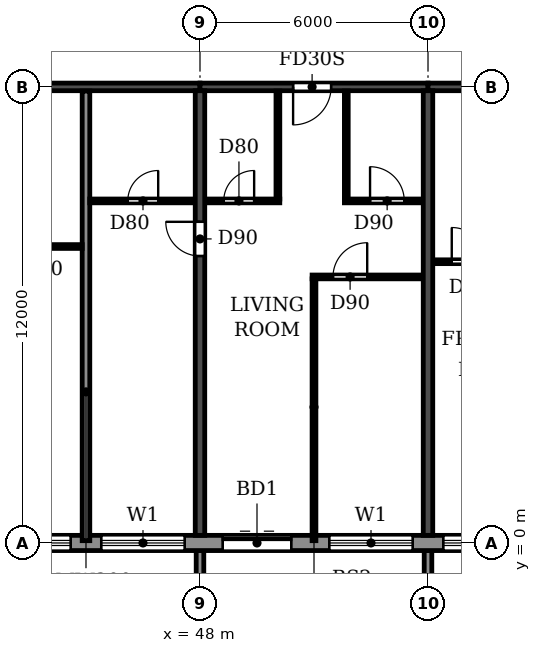
"""IFC4 building model, lengths in metres.
Left out: names, types, materials, properties, quantities, classifications, styles, units other than length and angle.
Written with IfcOpenShell. Run it as: python <this file> out.ifc"""

import sys

from ifc_helpers import new_model, si_unit, direction, frame, frame_2d, origin, place, context, subcontext, project, spatial, polyline, rectangle, outline, extrude, source, transform, mapped, element, fill, save


model = new_model("IFC4")
c1 = context("Model", 3, precision=1e-05, world=origin(), true_north=direction((0.0, 1.0)))
c2 = subcontext(c1, "Body", "Model", "MODEL_VIEW")
j1 = project(units=[si_unit("LENGTHUNIT", "METRE"), si_unit("PLANEANGLEUNIT", "RADIAN")], contexts=[c1])
p1 = place(None, origin())
s1 = spatial("IfcSite", under=j1, at=p1, CompositionType="ELEMENT")
p2 = place(p1, origin())
s2 = spatial("IfcBuilding", under=s1, at=p2, CompositionType="ELEMENT")
p3 = place(p2, frame((0.0, 0.0, 231.3)))
s3 = spatial("IfcBuildingStorey", under=s2, at=p3, CompositionType="ELEMENT", Elevation=231.3)
p4 = place(p3, frame((48.0, 0.2, 0.0), z_axis=(0.0, 0.0, 1.0), x_axis=(0.0, 1.0, 0.0)))
e1 = element("IfcWall", 1, at=p4, inside=s3, PredefinedType="SHEAR", context=c2, shape_type="SweptSolid", body=[
    extrude(rectangle(XDim=11.7, YDim=0.25, at=frame_2d((5.85, 0.0))), origin(), (0.0, 0.0, 1.0), 3.08),
])
p5 = place(p4, frame((7.35, 0.0, 0.0)))
e2 = element("IfcOpeningElement", 2, at=p5, cuts=e1, PredefinedType="OPENING", context=c2, shape_type="SweptSolid", body=[
    extrude(rectangle(XDim=0.9, YDim=2.1, at=frame_2d((0.45, 1.05))), frame((0.0, 0.135, 0.0), z_axis=(0.0, -1.0, 0.0), x_axis=(1.0, 0.0, 0.0)), (0.0, 0.0, 1.0), 0.27),
])
p6 = place(p3, frame((54.0, 0.2, 0.0), z_axis=(0.0, 0.0, 1.0), x_axis=(0.0, 1.0, 0.0)))
e3 = element("IfcWall", 3, at=p6, inside=s3, PredefinedType="SHEAR", context=c2, shape_type="SweptSolid", body=[
    extrude(rectangle(XDim=11.7, YDim=0.25, at=frame_2d((5.85, 0.0))), origin(), (0.0, 0.0, 1.0), 3.08),
])
p7 = place(p3, frame((42.0, 12.0, 0.0), z_axis=(0.0, 0.0, 1.0), x_axis=(1.0, 0.0, 0.0)))
e4 = element("IfcWall", 4, at=p7, inside=s3, PredefinedType="SHEAR", context=c2, shape_type="SweptSolid", body=[
    extrude(rectangle(XDim=6.0, YDim=0.2, at=frame_2d((3.0, 0.0))), origin(), (0.0, 0.0, 1.0), 2.48),
])
p8 = place(p3, frame((48.0, 12.0, 0.0), z_axis=(0.0, 0.0, 1.0), x_axis=(1.0, 0.0, 0.0)))
e5 = element("IfcWall", 5, at=p8, inside=s3, PredefinedType="SHEAR", context=c2, shape_type="SweptSolid", body=[
    extrude(rectangle(XDim=6.0, YDim=0.2, at=frame_2d((3.0, 0.0))), origin(), (0.0, 0.0, 1.0), 2.48),
])
p9 = place(p8, frame((2.45, 0.0, 0.0)))
e6 = element("IfcOpeningElement", 6, at=p9, cuts=e5, PredefinedType="OPENING", context=c2, shape_type="SweptSolid", body=[
    extrude(rectangle(XDim=1.0, YDim=2.1, at=frame_2d((0.5, 1.05))), frame((0.0, 0.11, 0.0), z_axis=(0.0, -1.0, 0.0), x_axis=(1.0, 0.0, 0.0)), (0.0, 0.0, 1.0), 0.22),
])
p10 = place(p3, frame((54.0, 12.0, 0.0), z_axis=(0.0, 0.0, 1.0), x_axis=(1.0, 0.0, 0.0)))
e7 = element("IfcWall", 7, at=p10, inside=s3, PredefinedType="SHEAR", context=c2, shape_type="SweptSolid", body=[
    extrude(rectangle(XDim=6.0, YDim=0.2, at=frame_2d((3.0, 0.0))), origin(), (0.0, 0.0, 1.0), 2.48),
])
p11 = place(p10, frame((2.55, 0.0, 0.0)))
e8 = element("IfcOpeningElement", 8, at=p11, cuts=e7, PredefinedType="OPENING", context=c2, shape_type="SweptSolid", body=[
    extrude(rectangle(XDim=1.0, YDim=2.1, at=frame_2d((0.5, 1.05))), frame((0.0, 0.11, 0.0), z_axis=(0.0, -1.0, 0.0), x_axis=(1.0, 0.0, 0.0)), (0.0, 0.0, 1.0), 0.22),
])
p12 = place(p3, frame((22.683, 0.0, 0.0), z_axis=(0.0, 0.0, 1.0), x_axis=(1.0, 0.0, 0.0)))
e9 = element("IfcWall", 9, at=p12, inside=s3, PredefinedType="STANDARD", context=c2, shape_type="SweptSolid", body=[
    extrude(rectangle(XDim=56.634, YDim=0.4, at=frame_2d((28.317, 0.0))), origin(), (0.0, 0.0, 1.0), 3.08),
])
p13 = place(p12, frame((1.917, 0.0, 0.0)))
e10 = element("IfcOpeningElement", 10, at=p13, cuts=e9, PredefinedType="OPENING", context=c2, shape_type="SweptSolid", body=[
    extrude(rectangle(XDim=1.8, YDim=2.4, at=frame_2d((0.9, 1.2))), frame((0.0, 0.21, 0.0), z_axis=(0.0, -1.0, 0.0), x_axis=(1.0, 0.0, 0.0)), (0.0, 0.0, 1.0), 0.42),
])
p14 = place(p12, frame((4.717, 0.0, 0.9)))
e11 = element("IfcOpeningElement", 11, at=p14, cuts=e9, PredefinedType="OPENING", context=c2, shape_type="SweptSolid", body=[
    extrude(rectangle(XDim=2.2, YDim=1.5, at=frame_2d((1.1, 0.75))), frame((0.0, 0.21, 0.0), z_axis=(0.0, -1.0, 0.0), x_axis=(1.0, 0.0, 0.0)), (0.0, 0.0, 1.0), 0.42),
])
p15 = place(p12, frame((7.717, 0.0, 0.9)))
e12 = element("IfcOpeningElement", 12, at=p15, cuts=e9, PredefinedType="OPENING", context=c2, shape_type="SweptSolid", body=[
    extrude(rectangle(XDim=2.2, YDim=1.5, at=frame_2d((1.1, 0.75))), frame((0.0, 0.21, 0.0), z_axis=(0.0, -1.0, 0.0), x_axis=(1.0, 0.0, 0.0)), (0.0, 0.0, 1.0), 0.42),
])
p16 = place(p12, frame((10.717, 0.0, 0.9)))
e13 = element("IfcOpeningElement", 13, at=p16, cuts=e9, PredefinedType="OPENING", context=c2, shape_type="SweptSolid", body=[
    extrude(rectangle(XDim=2.2, YDim=1.5, at=frame_2d((1.1, 0.75))), frame((0.0, 0.21, 0.0), z_axis=(0.0, -1.0, 0.0), x_axis=(1.0, 0.0, 0.0)), (0.0, 0.0, 1.0), 0.42),
])
p17 = place(p12, frame((13.717, 0.0, 0.9)))
e14 = element("IfcOpeningElement", 14, at=p17, cuts=e9, PredefinedType="OPENING", context=c2, shape_type="SweptSolid", body=[
    extrude(rectangle(XDim=2.2, YDim=1.5, at=frame_2d((1.1, 0.75))), frame((0.0, 0.21, 0.0), z_axis=(0.0, -1.0, 0.0), x_axis=(1.0, 0.0, 0.0)), (0.0, 0.0, 1.0), 0.42),
])
p18 = place(p12, frame((16.917, 0.0, 0.0)))
e15 = element("IfcOpeningElement", 15, at=p18, cuts=e9, PredefinedType="OPENING", context=c2, shape_type="SweptSolid", body=[
    extrude(rectangle(XDim=1.8, YDim=2.4, at=frame_2d((0.9, 1.2))), frame((0.0, 0.21, 0.0), z_axis=(0.0, -1.0, 0.0), x_axis=(1.0, 0.0, 0.0)), (0.0, 0.0, 1.0), 0.42),
])
p19 = place(p12, frame((19.717, 0.0, 0.9)))
e16 = element("IfcOpeningElement", 16, at=p19, cuts=e9, PredefinedType="OPENING", context=c2, shape_type="SweptSolid", body=[
    extrude(rectangle(XDim=2.2, YDim=1.5, at=frame_2d((1.1, 0.75))), frame((0.0, 0.21, 0.0), z_axis=(0.0, -1.0, 0.0), x_axis=(1.0, 0.0, 0.0)), (0.0, 0.0, 1.0), 0.42),
])
p20 = place(p12, frame((22.717, 0.0, 0.9)))
e17 = element("IfcOpeningElement", 17, at=p20, cuts=e9, PredefinedType="OPENING", context=c2, shape_type="SweptSolid", body=[
    extrude(rectangle(XDim=2.2, YDim=1.5, at=frame_2d((1.1, 0.75))), frame((0.0, 0.21, 0.0), z_axis=(0.0, -1.0, 0.0), x_axis=(1.0, 0.0, 0.0)), (0.0, 0.0, 1.0), 0.42),
])
p21 = place(p12, frame((25.917, 0.0, 0.0)))
e18 = element("IfcOpeningElement", 18, at=p21, cuts=e9, PredefinedType="OPENING", context=c2, shape_type="SweptSolid", body=[
    extrude(rectangle(XDim=1.8, YDim=2.4, at=frame_2d((0.9, 1.2))), frame((0.0, 0.21, 0.0), z_axis=(0.0, -1.0, 0.0), x_axis=(1.0, 0.0, 0.0)), (0.0, 0.0, 1.0), 0.42),
])
p22 = place(p12, frame((28.717, 0.0, 0.9)))
e19 = element("IfcOpeningElement", 19, at=p22, cuts=e9, PredefinedType="OPENING", context=c2, shape_type="SweptSolid", body=[
    extrude(rectangle(XDim=2.2, YDim=1.5, at=frame_2d((1.1, 0.75))), frame((0.0, 0.21, 0.0), z_axis=(0.0, -1.0, 0.0), x_axis=(1.0, 0.0, 0.0)), (0.0, 0.0, 1.0), 0.42),
])
p23 = place(p12, frame((31.717, 0.0, 0.9)))
e20 = element("IfcOpeningElement", 20, at=p23, cuts=e9, PredefinedType="OPENING", context=c2, shape_type="SweptSolid", body=[
    extrude(rectangle(XDim=2.2, YDim=1.5, at=frame_2d((1.1, 0.75))), frame((0.0, 0.21, 0.0), z_axis=(0.0, -1.0, 0.0), x_axis=(1.0, 0.0, 0.0)), (0.0, 0.0, 1.0), 0.42),
])
p24 = place(p12, frame((34.717, 0.0, 0.9)))
e21 = element("IfcOpeningElement", 21, at=p24, cuts=e9, PredefinedType="OPENING", context=c2, shape_type="SweptSolid", body=[
    extrude(rectangle(XDim=2.2, YDim=1.5, at=frame_2d((1.1, 0.75))), frame((0.0, 0.21, 0.0), z_axis=(0.0, -1.0, 0.0), x_axis=(1.0, 0.0, 0.0)), (0.0, 0.0, 1.0), 0.42),
])
p25 = place(p12, frame((37.717, 0.0, 0.9)))
e22 = element("IfcOpeningElement", 22, at=p25, cuts=e9, PredefinedType="OPENING", context=c2, shape_type="SweptSolid", body=[
    extrude(rectangle(XDim=2.2, YDim=1.5, at=frame_2d((1.1, 0.75))), frame((0.0, 0.21, 0.0), z_axis=(0.0, -1.0, 0.0), x_axis=(1.0, 0.0, 0.0)), (0.0, 0.0, 1.0), 0.42),
])
p26 = place(p12, frame((40.917, 0.0, 0.0)))
e23 = element("IfcOpeningElement", 23, at=p26, cuts=e9, PredefinedType="OPENING", context=c2, shape_type="SweptSolid", body=[
    extrude(rectangle(XDim=1.8, YDim=2.4, at=frame_2d((0.9, 1.2))), frame((0.0, 0.21, 0.0), z_axis=(0.0, -1.0, 0.0), x_axis=(1.0, 0.0, 0.0)), (0.0, 0.0, 1.0), 0.42),
])
p27 = place(p12, frame((43.717, 0.0, 0.9)))
e24 = element("IfcOpeningElement", 24, at=p27, cuts=e9, PredefinedType="OPENING", context=c2, shape_type="SweptSolid", body=[
    extrude(rectangle(XDim=2.2, YDim=1.5, at=frame_2d((1.1, 0.75))), frame((0.0, 0.21, 0.0), z_axis=(0.0, -1.0, 0.0), x_axis=(1.0, 0.0, 0.0)), (0.0, 0.0, 1.0), 0.42),
])
p28 = place(p12, frame((46.717, 0.0, 0.9)))
e25 = element("IfcOpeningElement", 25, at=p28, cuts=e9, PredefinedType="OPENING", context=c2, shape_type="SweptSolid", body=[
    extrude(rectangle(XDim=2.2, YDim=1.5, at=frame_2d((1.1, 0.75))), frame((0.0, 0.21, 0.0), z_axis=(0.0, -1.0, 0.0), x_axis=(1.0, 0.0, 0.0)), (0.0, 0.0, 1.0), 0.42),
])
p29 = place(p12, frame((49.717, 0.0, 0.9)))
e26 = element("IfcOpeningElement", 26, at=p29, cuts=e9, PredefinedType="OPENING", context=c2, shape_type="SweptSolid", body=[
    extrude(rectangle(XDim=2.2, YDim=1.5, at=frame_2d((1.1, 0.75))), frame((0.0, 0.21, 0.0), z_axis=(0.0, -1.0, 0.0), x_axis=(1.0, 0.0, 0.0)), (0.0, 0.0, 1.0), 0.42),
])
p30 = place(p12, frame((52.717, 0.0, 0.9)))
e27 = element("IfcOpeningElement", 27, at=p30, cuts=e9, PredefinedType="OPENING", context=c2, shape_type="SweptSolid", body=[
    extrude(rectangle(XDim=2.2, YDim=1.5, at=frame_2d((1.1, 0.75))), frame((0.0, 0.21, 0.0), z_axis=(0.0, -1.0, 0.0), x_axis=(1.0, 0.0, 0.0)), (0.0, 0.0, 1.0), 0.42),
])
m1 = source(origin(), c2, "Body", "SweptSolid", [
    extrude(outline(polyline([(0.0, 0.0), (0.2, 0.0), (0.2, 1.65), (0.0, 1.65), (0.0, 0.0)])), origin(), (0.0, 0.0, 1.0), 3.1),
])
for number, where in (
    (28, (47.9, -1.85, 0.0)),
    (29, (53.9, -1.85, 0.0)),
):
    element("IfcWall", number, at=place(p3, frame(where)), inside=s3, PredefinedType="STANDARD", context=c2, shape_type="MappedRepresentation", body=[
        mapped(m1, transform((0.0, 0.0, 0.0))),
    ])
p31 = place(p3, frame((45.0, 0.06, 0.0), z_axis=(0.0, 0.0, 1.0), x_axis=(0.0, 1.0, 0.0)))
e30 = element("IfcWall", 30, at=p31, inside=s3, PredefinedType="PARTITIONING", context=c2, shape_type="SweptSolid", body=[
    extrude(rectangle(XDim=11.83, YDim=0.2, at=frame_2d((5.915, 0.0))), origin(), (0.0, 0.0, 1.0), 3.08),
])
p32 = place(p3, frame((50.95, 7.0, 0.0), z_axis=(0.0, 0.0, 1.0), x_axis=(1.0, 0.0, 0.0)))
e31 = element("IfcWall", 31, at=p32, inside=s3, PredefinedType="PARTITIONING", context=c2, shape_type="SweptSolid", body=[
    extrude(rectangle(XDim=2.915, YDim=0.1, at=frame_2d((1.458, 0.0))), origin(), (0.0, 0.0, 1.0), 3.08),
])
p33 = place(p32, frame((0.55, 0.0, 0.0)))
e32 = element("IfcOpeningElement", 32, at=p33, cuts=e31, PredefinedType="OPENING", context=c2, shape_type="SweptSolid", body=[
    extrude(rectangle(XDim=0.9, YDim=2.1, at=frame_2d((0.45, 1.05))), frame((0.0, 0.06, 0.0), z_axis=(0.0, -1.0, 0.0), x_axis=(1.0, 0.0, 0.0)), (0.0, 0.0, 1.0), 0.12),
])
p34 = place(p3, frame((54.135, 7.4, 0.0), z_axis=(0.0, 0.0, 1.0), x_axis=(1.0, 0.0, 0.0)))
e33 = element("IfcWall", 33, at=p34, inside=s3, PredefinedType="PARTITIONING", context=c2, shape_type="SweptSolid", body=[
    extrude(rectangle(XDim=2.065, YDim=0.1, at=frame_2d((1.032, 0.0))), origin(), (0.0, 0.0, 1.0), 3.08),
])
p35 = place(p34, frame((0.49, 0.0, 0.0)))
e34 = element("IfcOpeningElement", 34, at=p35, cuts=e33, PredefinedType="OPENING", context=c2, shape_type="SweptSolid", body=[
    extrude(rectangle(XDim=0.9, YDim=2.1, at=frame_2d((0.45, 1.05))), frame((0.0, 0.06, 0.0), z_axis=(0.0, -1.0, 0.0), x_axis=(1.0, 0.0, 0.0)), (0.0, 0.0, 1.0), 0.12),
])
p36 = place(p3, frame((42.135, 7.8, 0.0), z_axis=(0.0, 0.0, 1.0), x_axis=(1.0, 0.0, 0.0)))
e35 = element("IfcWall", 35, at=p36, inside=s3, PredefinedType="PARTITIONING", context=c2, shape_type="SweptSolid", body=[
    extrude(rectangle(XDim=2.765, YDim=0.1, at=frame_2d((1.382, 0.0))), origin(), (0.0, 0.0, 1.0), 3.08),
])
p37 = place(p36, frame((0.965, 0.0, 0.0)))
e36 = element("IfcOpeningElement", 36, at=p37, cuts=e35, PredefinedType="OPENING", context=c2, shape_type="SweptSolid", body=[
    extrude(rectangle(XDim=0.8, YDim=2.1, at=frame_2d((0.4, 1.05))), frame((0.0, 0.06, 0.0), z_axis=(0.0, -1.0, 0.0), x_axis=(1.0, 0.0, 0.0)), (0.0, 0.0, 1.0), 0.12),
])
p38 = place(p3, frame((45.1, 9.0, 0.0), z_axis=(0.0, 0.0, 1.0), x_axis=(1.0, 0.0, 0.0)))
e37 = element("IfcWall", 37, at=p38, inside=s3, PredefinedType="PARTITIONING", context=c2, shape_type="SweptSolid", body=[
    extrude(rectangle(XDim=2.765, YDim=0.1, at=frame_2d((1.382, 0.0))), origin(), (0.0, 0.0, 1.0), 3.08),
])
p39 = place(p38, frame((1.0, 0.0, 0.0)))
e38 = element("IfcOpeningElement", 38, at=p39, cuts=e37, PredefinedType="OPENING", context=c2, shape_type="SweptSolid", body=[
    extrude(rectangle(XDim=0.8, YDim=2.1, at=frame_2d((0.4, 1.05))), frame((0.0, 0.06, 0.0), z_axis=(0.0, -1.0, 0.0), x_axis=(1.0, 0.0, 0.0)), (0.0, 0.0, 1.0), 0.12),
])
p40 = place(p3, frame((48.135, 9.0, 0.0), z_axis=(0.0, 0.0, 1.0), x_axis=(1.0, 0.0, 0.0)))
e39 = element("IfcWall", 39, at=p40, inside=s3, PredefinedType="PARTITIONING", context=c2, shape_type="SweptSolid", body=[
    extrude(rectangle(XDim=1.965, YDim=0.1, at=frame_2d((0.982, 0.0))), origin(), (0.0, 0.0, 1.0), 3.08),
])
p41 = place(p40, frame((0.49, 0.0, 0.0)))
e40 = element("IfcOpeningElement", 40, at=p41, cuts=e39, PredefinedType="OPENING", context=c2, shape_type="SweptSolid", body=[
    extrude(rectangle(XDim=0.8, YDim=2.1, at=frame_2d((0.4, 1.05))), frame((0.0, 0.06, 0.0), z_axis=(0.0, -1.0, 0.0), x_axis=(1.0, 0.0, 0.0)), (0.0, 0.0, 1.0), 0.12),
])
p42 = place(p3, frame((51.8, 9.0, 0.0), z_axis=(0.0, 0.0, 1.0), x_axis=(1.0, 0.0, 0.0)))
e41 = element("IfcWall", 41, at=p42, inside=s3, PredefinedType="PARTITIONING", context=c2, shape_type="SweptSolid", body=[
    extrude(rectangle(XDim=2.065, YDim=0.1, at=frame_2d((1.032, 0.0))), origin(), (0.0, 0.0, 1.0), 3.08),
])
p43 = place(p42, frame((0.675, 0.0, 0.0)))
e42 = element("IfcOpeningElement", 42, at=p43, cuts=e41, PredefinedType="OPENING", context=c2, shape_type="SweptSolid", body=[
    extrude(rectangle(XDim=0.9, YDim=2.1, at=frame_2d((0.45, 1.05))), frame((0.0, 0.06, 0.0), z_axis=(0.0, -1.0, 0.0), x_axis=(1.0, 0.0, 0.0)), (0.0, 0.0, 1.0), 0.12),
])
p44 = place(p3, frame((50.05, 9.05, 0.0), z_axis=(0.0, 0.0, 1.0), x_axis=(0.0, 1.0, 0.0)))
e43 = element("IfcWall", 43, at=p44, inside=s3, PredefinedType="PARTITIONING", context=c2, shape_type="SweptSolid", body=[
    extrude(rectangle(XDim=2.84, YDim=0.1, at=frame_2d((1.42, 0.0))), origin(), (0.0, 0.0, 1.0), 3.08),
])
p45 = place(p3, frame((51.0, 0.06, 0.0), z_axis=(0.0, 0.0, 1.0), x_axis=(0.0, 1.0, 0.0)))
e44 = element("IfcWall", 44, at=p45, inside=s3, PredefinedType="PARTITIONING", context=c2, shape_type="SweptSolid", body=[
    extrude(rectangle(XDim=6.89, YDim=0.1, at=frame_2d((3.445, 0.0))), origin(), (0.0, 0.0, 1.0), 3.08),
])
p46 = place(p3, frame((51.85, 9.05, 0.0), z_axis=(0.0, 0.0, 1.0), x_axis=(0.0, 1.0, 0.0)))
e45 = element("IfcWall", 45, at=p46, inside=s3, PredefinedType="PARTITIONING", context=c2, shape_type="SweptSolid", body=[
    extrude(rectangle(XDim=2.84, YDim=0.1, at=frame_2d((1.42, 0.0))), origin(), (0.0, 0.0, 1.0), 3.08),
])
p47 = place(p19, origin())
e46 = element("IfcWindow", 46, at=p47, inside=s3, PartitioningType="DOUBLE_PANEL_HORIZONTAL", PredefinedType="WINDOW", context=c2, shape_type="SweptSolid", body=[
    extrude(rectangle(XDim=2.2, YDim=1.5, at=frame_2d((1.1, 0.75))), frame((0.0, 0.03, 0.0), z_axis=(0.0, -1.0, 0.0), x_axis=(1.0, 0.0, 0.0)), (0.0, 0.0, 1.0), 0.06),
])
fill(e16, e46)
p48 = place(p20, origin())
e47 = element("IfcWindow", 47, at=p48, inside=s3, PartitioningType="DOUBLE_PANEL_HORIZONTAL", PredefinedType="WINDOW", context=c2, shape_type="SweptSolid", body=[
    extrude(rectangle(XDim=2.2, YDim=1.5, at=frame_2d((1.1, 0.75))), frame((0.0, 0.03, 0.0), z_axis=(0.0, -1.0, 0.0), x_axis=(1.0, 0.0, 0.0)), (0.0, 0.0, 1.0), 0.06),
])
fill(e17, e47)
p49 = place(p21, origin())
e48 = element("IfcDoor", 48, at=p49, inside=s3, OperationType="DOUBLE_DOOR_SLIDING", PredefinedType="DOOR", context=c2, shape_type="SweptSolid", body=[
    extrude(rectangle(XDim=1.8, YDim=2.4, at=frame_2d((0.9, 1.2))), frame((0.0, 0.025, 0.0), z_axis=(0.0, -1.0, 0.0), x_axis=(1.0, 0.0, 0.0)), (0.0, 0.0, 1.0), 0.05),
])
fill(e18, e48)
p50 = place(p22, origin())
e49 = element("IfcWindow", 49, at=p50, inside=s3, PartitioningType="DOUBLE_PANEL_HORIZONTAL", PredefinedType="WINDOW", context=c2, shape_type="SweptSolid", body=[
    extrude(rectangle(XDim=2.2, YDim=1.5, at=frame_2d((1.1, 0.75))), frame((0.0, 0.03, 0.0), z_axis=(0.0, -1.0, 0.0), x_axis=(1.0, 0.0, 0.0)), (0.0, 0.0, 1.0), 0.06),
])
fill(e19, e49)
p51 = place(p23, origin())
e50 = element("IfcWindow", 50, at=p51, inside=s3, PartitioningType="DOUBLE_PANEL_HORIZONTAL", PredefinedType="WINDOW", context=c2, shape_type="SweptSolid", body=[
    extrude(rectangle(XDim=2.2, YDim=1.5, at=frame_2d((1.1, 0.75))), frame((0.0, 0.03, 0.0), z_axis=(0.0, -1.0, 0.0), x_axis=(1.0, 0.0, 0.0)), (0.0, 0.0, 1.0), 0.06),
])
fill(e20, e50)
p52 = place(p39, origin())
e51 = element("IfcDoor", 51, at=p52, inside=s3, OperationType="SINGLE_SWING_RIGHT", PredefinedType="DOOR", context=c2, shape_type="SweptSolid", body=[
    extrude(rectangle(XDim=0.8, YDim=2.1, at=frame_2d((0.4, 1.05))), frame((0.0, 0.025, 0.0), z_axis=(0.0, -1.0, 0.0), x_axis=(1.0, 0.0, 0.0)), (0.0, 0.0, 1.0), 0.05),
])
fill(e38, e51)
p53 = place(p5, origin())
e52 = element("IfcDoor", 52, at=p53, inside=s3, OperationType="SINGLE_SWING_RIGHT", PredefinedType="DOOR", context=c2, shape_type="SweptSolid", body=[
    extrude(rectangle(XDim=0.9, YDim=2.1, at=frame_2d((0.45, 1.05))), frame((0.0, 0.025, 0.0), z_axis=(0.0, -1.0, 0.0), x_axis=(1.0, 0.0, 0.0)), (0.0, 0.0, 1.0), 0.05),
])
fill(e2, e52)
p54 = place(p41, origin())
e53 = element("IfcDoor", 53, at=p54, inside=s3, OperationType="SINGLE_SWING_RIGHT", PredefinedType="DOOR", context=c2, shape_type="SweptSolid", body=[
    extrude(rectangle(XDim=0.8, YDim=2.1, at=frame_2d((0.4, 1.05))), frame((0.0, 0.025, 0.0), z_axis=(0.0, -1.0, 0.0), x_axis=(1.0, 0.0, 0.0)), (0.0, 0.0, 1.0), 0.05),
])
fill(e40, e53)
p55 = place(p9, frame((1.0, 0.0, 0.0), z_axis=(0.0, 0.0, 1.0), x_axis=(-1.0, 0.0, 0.0)))
e54 = element("IfcDoor", 54, at=p55, inside=s3, OperationType="SINGLE_SWING_RIGHT", PredefinedType="DOOR", context=c2, shape_type="SweptSolid", body=[
    extrude(rectangle(XDim=1.0, YDim=2.1, at=frame_2d((0.5, 1.05))), frame((0.0, 0.025, 0.0), z_axis=(0.0, -1.0, 0.0), x_axis=(1.0, 0.0, 0.0)), (0.0, 0.0, 1.0), 0.05),
])
fill(e6, e54)
p56 = place(p33, origin())
e55 = element("IfcDoor", 55, at=p56, inside=s3, OperationType="SINGLE_SWING_RIGHT", PredefinedType="DOOR", context=c2, shape_type="SweptSolid", body=[
    extrude(rectangle(XDim=0.9, YDim=2.1, at=frame_2d((0.45, 1.05))), frame((0.0, 0.025, 0.0), z_axis=(0.0, -1.0, 0.0), x_axis=(1.0, 0.0, 0.0)), (0.0, 0.0, 1.0), 0.05),
])
fill(e32, e55)
p57 = place(p43, origin())
e56 = element("IfcDoor", 56, at=p57, inside=s3, OperationType="SINGLE_SWING_LEFT", PredefinedType="DOOR", context=c2, shape_type="SweptSolid", body=[
    extrude(rectangle(XDim=0.9, YDim=2.1, at=frame_2d((0.45, 1.05))), frame((0.0, 0.025, 0.0), z_axis=(0.0, -1.0, 0.0), x_axis=(1.0, 0.0, 0.0)), (0.0, 0.0, 1.0), 0.05),
])
fill(e42, e56)
p58 = place(p35, origin())
e57 = element("IfcDoor", 57, at=p58, inside=s3, OperationType="SINGLE_SWING_LEFT", PredefinedType="DOOR", context=c2, shape_type="SweptSolid", body=[
    extrude(rectangle(XDim=0.9, YDim=2.1, at=frame_2d((0.45, 1.05))), frame((0.0, 0.025, 0.0), z_axis=(0.0, -1.0, 0.0), x_axis=(1.0, 0.0, 0.0)), (0.0, 0.0, 1.0), 0.05),
])
fill(e34, e57)
save(model, sys.argv[1])
